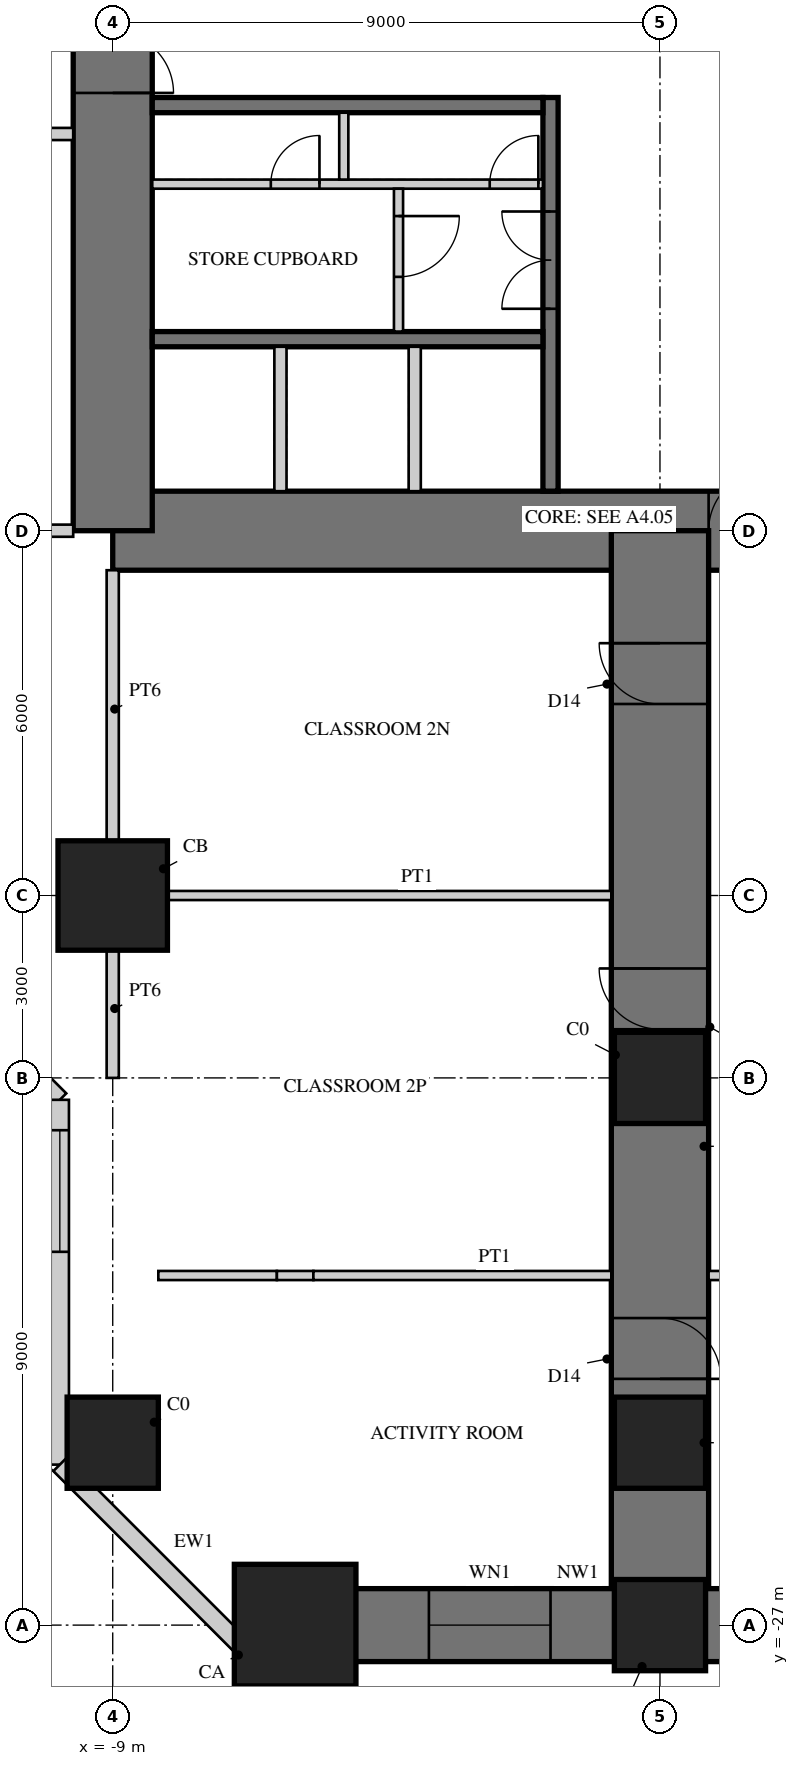
"""IFC4 building model, lengths in metres.
Left out: names, types, materials, properties, quantities, classifications, styles, units other than length and angle.
Written with IfcOpenShell. Run it as: python <this file> out.ifc"""

import sys

from ifc_helpers import new_model, si_unit, direction, frame, frame_2d, origin, origin_2d, place, context, subcontext, project, spatial, rectangle, hollow_rectangle, extrude, element, fill, save


model = new_model("IFC4")
c1 = context("Model", 3, precision=1e-05, world=origin(), true_north=direction((0.0, 1.0)))
c2 = subcontext(c1, "Body", "Model", "MODEL_VIEW")
j1 = project(units=[si_unit("LENGTHUNIT", "METRE"), si_unit("PLANEANGLEUNIT", "RADIAN")], contexts=[c1])
p1 = place(None, origin())
s1 = spatial("IfcSite", under=j1, at=p1, CompositionType="ELEMENT")
p2 = place(p1, origin())
s2 = spatial("IfcBuilding", under=s1, at=p2, CompositionType="ELEMENT")
p3 = place(p2, frame((0.0, 0.0, 9.5)))
s3 = spatial("IfcBuildingStorey", under=s2, at=p3, CompositionType="ELEMENT", Elevation=9.5)
p4 = place(p3, frame((-9.0, -9.0, 0.0), z_axis=(0.0, 0.0, 1.0), x_axis=(1.0, 0.0, 0.0)))
e1 = element("IfcWall", 1, at=p4, inside=s3, PredefinedType="SHEAR", context=c2, shape_type="SweptSolid", body=[
    extrude(rectangle(XDim=18.0, YDim=1.3, at=frame_2d((9.0, 0.0))), origin(), (0.0, 0.0, 1.0), 4.5),
])
p5 = place(p4, frame((9.8, 0.0, 0.0)))
e2 = element("IfcOpeningElement", 2, at=p5, cuts=e1, PredefinedType="OPENING", context=c2, shape_type="SweptSolid", body=[
    extrude(rectangle(XDim=1.0, YDim=2.4, at=frame_2d((0.5, 1.2))), frame((0.0, 0.66, 0.0), z_axis=(0.0, -1.0, 0.0), x_axis=(1.0, 0.0, 0.0)), (0.0, 0.0, 1.0), 1.32),
])
p6 = place(p3, frame((-9.0, 9.0, 0.0), z_axis=(0.0, 0.0, 1.0), x_axis=(0.0, -1.0, 0.0)))
e3 = element("IfcWall", 3, at=p6, inside=s3, PredefinedType="SHEAR", context=c2, shape_type="SweptSolid", body=[
    extrude(rectangle(XDim=18.0, YDim=1.3, at=frame_2d((9.0, 0.0))), origin(), (0.0, 0.0, 1.0), 4.5),
])
p7 = place(p6, frame((9.8, 0.0, 0.0)))
e4 = element("IfcOpeningElement", 4, at=p7, cuts=e3, PredefinedType="OPENING", context=c2, shape_type="SweptSolid", body=[
    extrude(rectangle(XDim=1.0, YDim=2.4, at=frame_2d((0.5, 1.2))), frame((0.0, 0.66, 0.0), z_axis=(0.0, -1.0, 0.0), x_axis=(1.0, 0.0, 0.0)), (0.0, 0.0, 1.0), 1.32),
])
p8 = place(p3, frame((-1.8, -1.875, 0.0), z_axis=(0.0, 0.0, 1.0), x_axis=(0.0, -1.0, 0.0)))
e5 = element("IfcWall", 5, at=p8, inside=s3, PredefinedType="SHEAR", context=c2, shape_type="SweptSolid", body=[
    extrude(rectangle(XDim=6.475, YDim=0.25, at=frame_2d((3.238, 0.0))), origin(), (0.0, 0.0, 1.0), 4.5),
])
p9 = place(p8, frame((1.875, 0.0, 0.0)))
e6 = element("IfcOpeningElement", 6, at=p9, cuts=e5, PredefinedType="OPENING", context=c2, shape_type="SweptSolid", body=[
    extrude(rectangle(XDim=1.6, YDim=2.4, at=frame_2d((0.8, 1.2))), frame((0.0, 0.135, 0.0), z_axis=(0.0, -1.0, 0.0), x_axis=(1.0, 0.0, 0.0)), (0.0, 0.0, 1.0), 0.27),
])
for number, where, z_axis, x_axis in (
    (7, (-1.925, -2.0, 0.0), (0.0, 0.0, 1.0), (-1.0, 0.0, 0.0)),
    (8, (-1.925, -5.85, 0.0), (0.0, 0.0, 1.0), (-1.0, 0.0, 0.0)),
):
    element("IfcWall", number, at=place(p3, frame(where, z_axis=z_axis, x_axis=x_axis)), inside=s3, PredefinedType="SHEAR", context=c2, shape_type="SweptSolid", body=[
        extrude(rectangle(XDim=6.425, YDim=0.25, at=frame_2d((3.212, 0.0))), origin(), (0.0, 0.0, 1.0), 4.5),
    ])
p10 = place(p3, frame((-1.925, -3.3, 0.0), z_axis=(0.0, 0.0, 1.0), x_axis=(-1.0, 0.0, 0.0)))
e9 = element("IfcWall", 9, at=p10, inside=s3, PredefinedType="PARTITIONING", context=c2, shape_type="SweptSolid", body=[
    extrude(rectangle(XDim=6.425, YDim=0.15, at=frame_2d((3.212, 0.0))), origin(), (0.0, 0.0, 1.0), 4.5),
])
p11 = place(p10, frame((0.075, 0.0, 0.0)))
e10 = element("IfcOpeningElement", 10, at=p11, cuts=e9, PredefinedType="OPENING", context=c2, shape_type="SweptSolid", body=[
    extrude(rectangle(XDim=0.8, YDim=2.1, at=frame_2d((0.4, 1.05))), frame((0.0, 0.085, 0.0), z_axis=(0.0, -1.0, 0.0), x_axis=(1.0, 0.0, 0.0)), (0.0, 0.0, 1.0), 0.17),
])
p12 = place(p10, frame((3.675, 0.0, 0.0)))
e11 = element("IfcOpeningElement", 11, at=p12, cuts=e9, PredefinedType="OPENING", context=c2, shape_type="SweptSolid", body=[
    extrude(rectangle(XDim=0.8, YDim=2.1, at=frame_2d((0.4, 1.05))), frame((0.0, 0.085, 0.0), z_axis=(0.0, -1.0, 0.0), x_axis=(1.0, 0.0, 0.0)), (0.0, 0.0, 1.0), 0.17),
])
p13 = place(p3, frame((-5.2, -2.125, 0.0), z_axis=(0.0, 0.0, 1.0), x_axis=(0.0, -1.0, 0.0)))
e12 = element("IfcWall", 12, at=p13, inside=s3, PredefinedType="PARTITIONING", context=c2, shape_type="SweptSolid", body=[
    extrude(rectangle(XDim=1.1, YDim=0.15, at=frame_2d((0.55, 0.0))), origin(), (0.0, 0.0, 1.0), 4.5),
])
for number, where, z_axis, x_axis in (
    (13, (-4.033, -5.975, 0.0), (0.0, 0.0, 1.0), (0.0, -1.0, 0.0)),
    (14, (-6.242, -5.975, 0.0), (0.0, 0.0, 1.0), (0.0, -1.0, 0.0)),
):
    element("IfcWall", number, at=place(p3, frame(where, z_axis=z_axis, x_axis=x_axis)), inside=s3, PredefinedType="PARTITIONING", context=c2, shape_type="SweptSolid", body=[
        extrude(rectangle(XDim=2.375, YDim=0.2, at=frame_2d((1.188, 0.0))), origin(), (0.0, 0.0, 1.0), 4.5),
    ])
p14 = place(p3, frame((0.0, -9.0, 0.0), z_axis=(0.0, 0.0, 1.0), x_axis=(0.0, -1.0, 0.0)))
e15 = element("IfcWall", 15, at=p14, inside=s3, PredefinedType="SHEAR", context=c2, shape_type="SweptSolid", body=[
    extrude(rectangle(XDim=18.0, YDim=1.6, at=frame_2d((9.0, 0.0))), origin(), (0.0, 0.0, 1.0), 4.5),
])
p15 = place(p14, frame((1.85, 0.0, 0.0)))
e16 = element("IfcOpeningElement", 16, at=p15, cuts=e15, PredefinedType="OPENING", context=c2, shape_type="SweptSolid", body=[
    extrude(rectangle(XDim=1.0, YDim=2.2, at=frame_2d((0.5, 1.1))), frame((0.0, 0.81, 0.0), z_axis=(0.0, -1.0, 0.0), x_axis=(1.0, 0.0, 0.0)), (0.0, 0.0, 1.0), 1.62),
])
p16 = place(p14, frame((7.2, 0.0, 0.0)))
e17 = element("IfcOpeningElement", 17, at=p16, cuts=e15, PredefinedType="OPENING", context=c2, shape_type="SweptSolid", body=[
    extrude(rectangle(XDim=1.0, YDim=2.2, at=frame_2d((0.5, 1.1))), frame((0.0, 0.81, 0.0), z_axis=(0.0, -1.0, 0.0), x_axis=(1.0, 0.0, 0.0)), (0.0, 0.0, 1.0), 1.62),
])
p17 = place(p14, frame((12.95, 0.0, 0.0)))
e18 = element("IfcOpeningElement", 18, at=p17, cuts=e15, PredefinedType="OPENING", context=c2, shape_type="SweptSolid", body=[
    extrude(rectangle(XDim=1.0, YDim=2.2, at=frame_2d((0.5, 1.1))), frame((0.0, 0.81, 0.0), z_axis=(0.0, -1.0, 0.0), x_axis=(1.0, 0.0, 0.0)), (0.0, 0.0, 1.0), 1.62),
])
p18 = place(p3, frame((-6.0, -27.0, 0.0), z_axis=(0.0, 0.0, 1.0), x_axis=(1.0, 0.0, 0.0)))
e19 = element("IfcWall", 19, at=p18, inside=s3, PredefinedType="SHEAR", context=c2, shape_type="SweptSolid", body=[
    extrude(rectangle(XDim=12.0, YDim=1.2, at=frame_2d((6.0, 0.0))), origin(), (0.0, 0.0, 1.0), 4.5),
])
p19 = place(p18, frame((2.2, 0.0, 0.9)))
e20 = element("IfcOpeningElement", 20, at=p19, cuts=e19, PredefinedType="OPENING", context=c2, shape_type="SweptSolid", body=[
    extrude(rectangle(XDim=2.0, YDim=1.8, at=frame_2d((1.0, 0.9))), frame((0.0, 0.61, 0.0), z_axis=(0.0, -1.0, 0.0), x_axis=(1.0, 0.0, 0.0)), (0.0, 0.0, 1.0), 1.22),
])
p20 = place(p18, frame((7.8, 0.0, 0.9)))
e21 = element("IfcOpeningElement", 21, at=p20, cuts=e19, PredefinedType="OPENING", context=c2, shape_type="SweptSolid", body=[
    extrude(rectangle(XDim=2.0, YDim=1.8, at=frame_2d((1.0, 0.9))), frame((0.0, 0.61, 0.0), z_axis=(0.0, -1.0, 0.0), x_axis=(1.0, 0.0, 0.0)), (0.0, 0.0, 1.0), 1.22),
])
p21 = place(p3, frame((-9.0, -15.0, 0.0), z_axis=(0.0, 0.0, 1.0), x_axis=(1.0, 0.0, 0.0)))
e22 = element("IfcColumn", 22, at=p21, inside=s3, PredefinedType="COLUMN", context=c2, shape_type="SweptSolid", body=[
    extrude(rectangle(XDim=1.8, YDim=1.8, at=origin_2d()), origin(), (0.0, 0.0, 1.0), 4.5),
])
p22 = place(p3, frame((-9.0, -24.0, 0.0), z_axis=(0.0, 0.0, 1.0), x_axis=(1.0, 0.0, 0.0)))
e23 = element("IfcColumn", 23, at=p22, inside=s3, PredefinedType="COLUMN", context=c2, shape_type="SweptSolid", body=[
    extrude(rectangle(XDim=1.5, YDim=1.5, at=origin_2d()), origin(), (0.0, 0.0, 1.0), 4.5),
])
p23 = place(p3, frame((-6.0, -27.0, 0.0), z_axis=(0.0, 0.0, 1.0), x_axis=(1.0, 0.0, 0.0)))
e24 = element("IfcColumn", 24, at=p23, inside=s3, PredefinedType="COLUMN", context=c2, shape_type="SweptSolid", body=[
    extrude(rectangle(XDim=2.0, YDim=2.0, at=origin_2d()), origin(), (0.0, 0.0, 1.0), 4.5),
])
for number, where, z_axis, x_axis in (
    (25, (0.0, -27.0, 0.0), (0.0, 0.0, 1.0), (1.0, 0.0, 0.0)),
    (26, (0.0, -18.0, 0.0), (0.0, 0.0, 1.0), (1.0, 0.0, 0.0)),
    (27, (0.0, -24.0, 0.0), (0.0, 0.0, 1.0), (1.0, 0.0, 0.0)),
):
    element("IfcColumn", number, at=place(p3, frame(where, z_axis=z_axis, x_axis=x_axis)), inside=s3, PredefinedType="COLUMN", context=c2, shape_type="SweptSolid", body=[
        extrude(rectangle(XDim=1.5, YDim=1.5, at=origin_2d()), origin(), (0.0, 0.0, 1.0), 4.5),
    ])
p24 = place(p3, frame((-18.36, -9.87, 0.0), z_axis=(0.0, 0.0, 1.0), x_axis=(0.707106781187, -0.707106781187, 0.0)))
e28 = element("IfcWall", 28, at=p24, inside=s3, PredefinedType="SOLIDWALL", context=c2, shape_type="SweptSolid", body=[
    extrude(rectangle(XDim=12.007, YDim=0.3, at=frame_2d((6.003, 0.0))), origin(), (0.0, 0.0, 1.0), 4.3),
])
p25 = place(p24, frame((0.501, 0.0, 0.9)))
e29 = element("IfcOpeningElement", 29, at=p25, cuts=e28, PredefinedType="OPENING", context=c2, shape_type="SweptSolid", body=[
    extrude(rectangle(XDim=2.0, YDim=1.8, at=frame_2d((1.0, 0.9))), frame((0.0, 0.16, 0.0), z_axis=(0.0, -1.0, 0.0), x_axis=(1.0, 0.0, 0.0)), (0.0, 0.0, 1.0), 0.32),
])
p26 = place(p24, frame((9.506, 0.0, 0.9)))
e30 = element("IfcOpeningElement", 30, at=p26, cuts=e28, PredefinedType="OPENING", context=c2, shape_type="SweptSolid", body=[
    extrude(rectangle(XDim=2.0, YDim=1.8, at=frame_2d((1.0, 0.9))), frame((0.0, 0.16, 0.0), z_axis=(0.0, -1.0, 0.0), x_axis=(1.0, 0.0, 0.0)), (0.0, 0.0, 1.0), 0.32),
])
p27 = place(p3, frame((-9.87, -18.36, 0.0), z_axis=(0.0, 0.0, 1.0), x_axis=(0.0, -1.0, 0.0)))
e31 = element("IfcWall", 31, at=p27, inside=s3, PredefinedType="SOLIDWALL", context=c2, shape_type="SweptSolid", body=[
    extrude(rectangle(XDim=6.0, YDim=0.3, at=frame_2d((3.0, 0.0))), origin(), (0.0, 0.0, 1.0), 4.3),
])
p28 = place(p27, frame((0.5, 0.0, 0.9)))
e32 = element("IfcOpeningElement", 32, at=p28, cuts=e31, PredefinedType="OPENING", context=c2, shape_type="SweptSolid", body=[
    extrude(rectangle(XDim=2.0, YDim=1.8, at=frame_2d((1.0, 0.9))), frame((0.0, 0.16, 0.0), z_axis=(0.0, -1.0, 0.0), x_axis=(1.0, 0.0, 0.0)), (0.0, 0.0, 1.0), 0.32),
])
p29 = place(p3, frame((-9.87, -24.36, 0.0), z_axis=(0.0, 0.0, 1.0), x_axis=(0.707106781187, -0.707106781187, 0.0)))
e33 = element("IfcWall", 33, at=p29, inside=s3, PredefinedType="SOLIDWALL", context=c2, shape_type="SweptSolid", body=[
    extrude(rectangle(XDim=4.582, YDim=0.3, at=frame_2d((2.291, 0.0))), origin(), (0.0, 0.0, 1.0), 4.3),
])
p30 = place(p3, frame((-4.3, -3.375, 0.0), z_axis=(0.0, 0.0, 1.0), x_axis=(0.0, -1.0, 0.0)))
e34 = element("IfcWall", 34, at=p30, inside=s3, PredefinedType="PARTITIONING", context=c2, shape_type="SweptSolid", body=[
    extrude(rectangle(XDim=2.35, YDim=0.15, at=frame_2d((1.175, 0.0))), origin(), (0.0, 0.0, 1.0), 4.3),
])
p31 = place(p30, frame((0.45, 0.0, 0.0)))
e35 = element("IfcOpeningElement", 35, at=p31, cuts=e34, PredefinedType="OPENING", context=c2, shape_type="SweptSolid", body=[
    extrude(rectangle(XDim=1.0, YDim=2.1, at=frame_2d((0.5, 1.05))), frame((0.0, 0.085, 0.0), z_axis=(0.0, -1.0, 0.0), x_axis=(1.0, 0.0, 0.0)), (0.0, 0.0, 1.0), 0.17),
])
p32 = place(p3, frame((-8.25, -15.0, 0.0), z_axis=(0.0, 0.0, 1.0), x_axis=(1.0, 0.0, 0.0)))
e36 = element("IfcWall", 36, at=p32, inside=s3, PredefinedType="PARTITIONING", context=c2, shape_type="SweptSolid", body=[
    extrude(rectangle(XDim=7.45, YDim=0.15, at=frame_2d((3.725, 0.0))), origin(), (0.0, 0.0, 1.0), 3.35),
])
p33 = place(p3, frame((-8.25, -21.25, 0.0), z_axis=(0.0, 0.0, 1.0), x_axis=(1.0, 0.0, 0.0)))
e37 = element("IfcWall", 37, at=p33, inside=s3, PredefinedType="PARTITIONING", context=c2, shape_type="SweptSolid", body=[
    extrude(rectangle(XDim=1.95, YDim=0.15, at=frame_2d((0.975, 0.0))), origin(), (0.0, 0.0, 1.0), 3.35),
])
p34 = place(p3, frame((-6.3, -21.25, 0.0), z_axis=(0.0, 0.0, 1.0), x_axis=(1.0, 0.0, 0.0)))
e38 = element("IfcWall", 38, at=p34, inside=s3, PredefinedType="PARTITIONING", context=c2, shape_type="SweptSolid", body=[
    extrude(rectangle(XDim=0.6, YDim=0.15, at=frame_2d((0.3, 0.0))), origin(), (0.0, 0.0, 1.0), 4.3),
])
p35 = place(p3, frame((-5.7, -21.25, 0.0), z_axis=(0.0, 0.0, 1.0), x_axis=(1.0, 0.0, 0.0)))
e39 = element("IfcWall", 39, at=p35, inside=s3, PredefinedType="PARTITIONING", context=c2, shape_type="SweptSolid", body=[
    extrude(rectangle(XDim=4.9, YDim=0.15, at=frame_2d((2.45, 0.0))), origin(), (0.0, 0.0, 1.0), 3.35),
])
p36 = place(p3, frame((0.8, -21.25, 0.0), z_axis=(0.0, 0.0, 1.0), x_axis=(1.0, 0.0, 0.0)))
e40 = element("IfcWall", 40, at=p36, inside=s3, PredefinedType="PARTITIONING", context=c2, shape_type="SweptSolid", body=[
    extrude(rectangle(XDim=4.9, YDim=0.15, at=frame_2d((2.45, 0.0))), origin(), (0.0, 0.0, 1.0), 3.35),
])
p37 = place(p36, frame((0.35, 0.0, 0.0)))
e41 = element("IfcOpeningElement", 41, at=p37, cuts=e40, PredefinedType="OPENING", context=c2, shape_type="SweptSolid", body=[
    extrude(rectangle(XDim=1.0, YDim=2.2, at=frame_2d((0.5, 1.1))), frame((0.0, 0.085, 0.0), z_axis=(0.0, -1.0, 0.0), x_axis=(1.0, 0.0, 0.0)), (0.0, 0.0, 1.0), 0.17),
])
p38 = place(p3, frame((-9.65, -2.475, 0.0), z_axis=(0.0, 0.0, 1.0), x_axis=(-1.0, 0.0, 0.0)))
e42 = element("IfcWall", 42, at=p38, inside=s3, PredefinedType="SOLIDWALL", context=c2, shape_type="SweptSolid", body=[
    extrude(rectangle(XDim=11.6, YDim=0.2, at=frame_2d((5.8, 0.0))), origin(), (0.0, 0.0, 1.0), 4.3),
])
p39 = place(p38, frame((1.2, 0.0, 0.0)))
e43 = element("IfcOpeningElement", 43, at=p39, cuts=e42, PredefinedType="OPENING", context=c2, shape_type="SweptSolid", body=[
    extrude(rectangle(XDim=1.0, YDim=2.2, at=frame_2d((0.5, 1.1))), frame((0.0, 0.11, 0.0), z_axis=(0.0, -1.0, 0.0), x_axis=(1.0, 0.0, 0.0)), (0.0, 0.0, 1.0), 0.22),
])
p40 = place(p38, frame((6.55, 0.0, 0.0)))
e44 = element("IfcOpeningElement", 44, at=p40, cuts=e42, PredefinedType="OPENING", context=c2, shape_type="SweptSolid", body=[
    extrude(rectangle(XDim=1.0, YDim=2.2, at=frame_2d((0.5, 1.1))), frame((0.0, 0.11, 0.0), z_axis=(0.0, -1.0, 0.0), x_axis=(1.0, 0.0, 0.0)), (0.0, 0.0, 1.0), 0.22),
])
p41 = place(p3, frame((-9.65, -9.0, 0.0), z_axis=(0.0, 0.0, 1.0), x_axis=(-1.0, 0.0, 0.0)))
e45 = element("IfcWall", 45, at=p41, inside=s3, PredefinedType="SOLIDWALL", context=c2, shape_type="SweptSolid", body=[
    extrude(rectangle(XDim=4.6, YDim=0.2, at=frame_2d((2.3, 0.0))), origin(), (0.0, 0.0, 1.0), 3.3),
])
p42 = place(p41, frame((1.2, 0.0, 0.0)))
e46 = element("IfcOpeningElement", 46, at=p42, cuts=e45, PredefinedType="OPENING", context=c2, shape_type="SweptSolid", body=[
    extrude(rectangle(XDim=1.0, YDim=2.2, at=frame_2d((0.5, 1.1))), frame((0.0, 0.11, 0.0), z_axis=(0.0, -1.0, 0.0), x_axis=(1.0, 0.0, 0.0)), (0.0, 0.0, 1.0), 0.22),
])
p43 = place(p3, frame((-9.0, -14.25, 0.0), z_axis=(0.0, 0.0, 1.0), x_axis=(0.0, 1.0, 0.0)))
e47 = element("IfcWall", 47, at=p43, inside=s3, PredefinedType="SOLIDWALL", context=c2, shape_type="SweptSolid", body=[
    extrude(rectangle(XDim=4.6, YDim=0.2, at=frame_2d((2.3, 0.0))), origin(), (0.0, 0.0, 1.0), 3.3),
])
p44 = place(p3, frame((-9.0, -18.0, 0.0), z_axis=(0.0, 0.0, 1.0), x_axis=(0.0, 1.0, 0.0)))
e48 = element("IfcWall", 48, at=p44, inside=s3, PredefinedType="SOLIDWALL", context=c2, shape_type="SweptSolid", body=[
    extrude(rectangle(XDim=2.25, YDim=0.2, at=frame_2d((1.125, 0.0))), origin(), (0.0, 0.0, 1.0), 3.3),
])
p45 = place(p28, origin())
e49 = element("IfcWindow", 49, at=p45, inside=s3, PartitioningType="SINGLE_PANEL", PredefinedType="WINDOW", context=c2, shape_type="SweptSolid", body=[
    extrude(hollow_rectangle(XDim=2.0, YDim=1.8, WallThickness=0.06, at=frame_2d((1.0, 0.9))), frame((0.0, 0.03, 0.0), z_axis=(0.0, -1.0, 0.0), x_axis=(1.0, 0.0, 0.0)), (0.0, 0.0, 1.0), 0.06),
    extrude(rectangle(XDim=1.879, YDim=1.679, at=frame_2d((1.0, 0.9))), frame((0.0, 0.03, 0.0), z_axis=(0.0, -1.0, 0.0), x_axis=(1.0, 0.0, 0.0)), (0.0, 0.0, 1.0), 0.06),
])
fill(e32, e49)
p46 = place(p19, origin())
e50 = element("IfcWindow", 50, at=p46, inside=s3, PartitioningType="SINGLE_PANEL", PredefinedType="WINDOW", context=c2, shape_type="SweptSolid", body=[
    extrude(hollow_rectangle(XDim=2.0, YDim=1.8, WallThickness=0.06, at=frame_2d((1.0, 0.9))), frame((0.0, 0.03, 0.0), z_axis=(0.0, -1.0, 0.0), x_axis=(1.0, 0.0, 0.0)), (0.0, 0.0, 1.0), 0.06),
    extrude(rectangle(XDim=1.879, YDim=1.679, at=frame_2d((1.0, 0.9))), frame((0.0, 0.03, 0.0), z_axis=(0.0, -1.0, 0.0), x_axis=(1.0, 0.0, 0.0)), (0.0, 0.0, 1.0), 0.06),
])
fill(e20, e50)
p47 = place(p31, origin())
e51 = element("IfcDoor", 51, at=p47, inside=s3, OperationType="SINGLE_SWING_LEFT", PredefinedType="DOOR", context=c2, shape_type="SweptSolid", body=[
    extrude(rectangle(XDim=1.0, YDim=2.1, at=frame_2d((0.5, 1.05))), frame((0.0, 0.025, 0.0), z_axis=(0.0, -1.0, 0.0), x_axis=(1.0, 0.0, 0.0)), (0.0, 0.0, 1.0), 0.05),
])
fill(e35, e51)
p48 = place(p15, frame((1.0, 0.0, 0.0), z_axis=(0.0, 0.0, 1.0), x_axis=(-1.0, 0.0, 0.0)))
e52 = element("IfcDoor", 52, at=p48, inside=s3, OperationType="SINGLE_SWING_RIGHT", PredefinedType="DOOR", context=c2, shape_type="SweptSolid", body=[
    extrude(rectangle(XDim=1.0, YDim=2.2, at=frame_2d((0.5, 1.1))), frame((0.0, 0.025, 0.0), z_axis=(0.0, -1.0, 0.0), x_axis=(1.0, 0.0, 0.0)), (0.0, 0.0, 1.0), 0.05),
])
fill(e16, e52)
p49 = place(p16, frame((1.0, 0.0, 0.0), z_axis=(0.0, 0.0, 1.0), x_axis=(-1.0, 0.0, 0.0)))
e53 = element("IfcDoor", 53, at=p49, inside=s3, OperationType="SINGLE_SWING_RIGHT", PredefinedType="DOOR", context=c2, shape_type="SweptSolid", body=[
    extrude(rectangle(XDim=1.0, YDim=2.2, at=frame_2d((0.5, 1.1))), frame((0.0, 0.025, 0.0), z_axis=(0.0, -1.0, 0.0), x_axis=(1.0, 0.0, 0.0)), (0.0, 0.0, 1.0), 0.05),
])
fill(e17, e53)
p50 = place(p17, origin())
e54 = element("IfcDoor", 54, at=p50, inside=s3, OperationType="SINGLE_SWING_RIGHT", PredefinedType="DOOR", context=c2, shape_type="SweptSolid", body=[
    extrude(rectangle(XDim=1.0, YDim=2.2, at=frame_2d((0.5, 1.1))), frame((0.0, 0.025, 0.0), z_axis=(0.0, -1.0, 0.0), x_axis=(1.0, 0.0, 0.0)), (0.0, 0.0, 1.0), 0.05),
])
fill(e18, e54)
p51 = place(p5, origin())
e55 = element("IfcDoor", 55, at=p51, inside=s3, OperationType="SINGLE_SWING_RIGHT", PredefinedType="DOOR", context=c2, shape_type="SweptSolid", body=[
    extrude(rectangle(XDim=1.0, YDim=2.4, at=frame_2d((0.5, 1.2))), frame((0.0, 0.055, 0.0), z_axis=(0.0, -1.0, 0.0), x_axis=(1.0, 0.0, 0.0)), (0.0, 0.0, 1.0), 0.05),
])
fill(e2, e55)
p52 = place(p7, origin())
e56 = element("IfcDoor", 56, at=p52, inside=s3, OperationType="SINGLE_SWING_RIGHT", PredefinedType="DOOR", context=c2, shape_type="SweptSolid", body=[
    extrude(rectangle(XDim=1.0, YDim=2.4, at=frame_2d((0.5, 1.2))), frame((0.0, 0.055, 0.0), z_axis=(0.0, -1.0, 0.0), x_axis=(1.0, 0.0, 0.0)), (0.0, 0.0, 1.0), 0.05),
])
fill(e4, e56)
p53 = place(p9, frame((1.6, 0.0, 0.0), z_axis=(0.0, 0.0, 1.0), x_axis=(-1.0, 0.0, 0.0)))
e57 = element("IfcDoor", 57, at=p53, inside=s3, OperationType="DOUBLE_DOOR_SINGLE_SWING", PredefinedType="DOOR", context=c2, shape_type="SweptSolid", body=[
    extrude(rectangle(XDim=1.6, YDim=2.4, at=frame_2d((0.8, 1.2))), frame((0.0, 0.025, 0.0), z_axis=(0.0, -1.0, 0.0), x_axis=(1.0, 0.0, 0.0)), (0.0, 0.0, 1.0), 0.05),
])
fill(e6, e57)
p54 = place(p11, frame((0.8, 0.0, 0.0), z_axis=(0.0, 0.0, 1.0), x_axis=(-1.0, 0.0, 0.0)))
e58 = element("IfcDoor", 58, at=p54, inside=s3, OperationType="SINGLE_SWING_RIGHT", PredefinedType="DOOR", context=c2, shape_type="SweptSolid", body=[
    extrude(rectangle(XDim=0.8, YDim=2.1, at=frame_2d((0.4, 1.05))), frame((0.0, 0.025, 0.0), z_axis=(0.0, -1.0, 0.0), x_axis=(1.0, 0.0, 0.0)), (0.0, 0.0, 1.0), 0.05),
])
fill(e10, e58)
p55 = place(p12, frame((0.8, 0.0, 0.0), z_axis=(0.0, 0.0, 1.0), x_axis=(-1.0, 0.0, 0.0)))
e59 = element("IfcDoor", 59, at=p55, inside=s3, OperationType="SINGLE_SWING_RIGHT", PredefinedType="DOOR", context=c2, shape_type="SweptSolid", body=[
    extrude(rectangle(XDim=0.8, YDim=2.1, at=frame_2d((0.4, 1.05))), frame((0.0, 0.025, 0.0), z_axis=(0.0, -1.0, 0.0), x_axis=(1.0, 0.0, 0.0)), (0.0, 0.0, 1.0), 0.05),
])
fill(e11, e59)
save(model, sys.argv[1])
